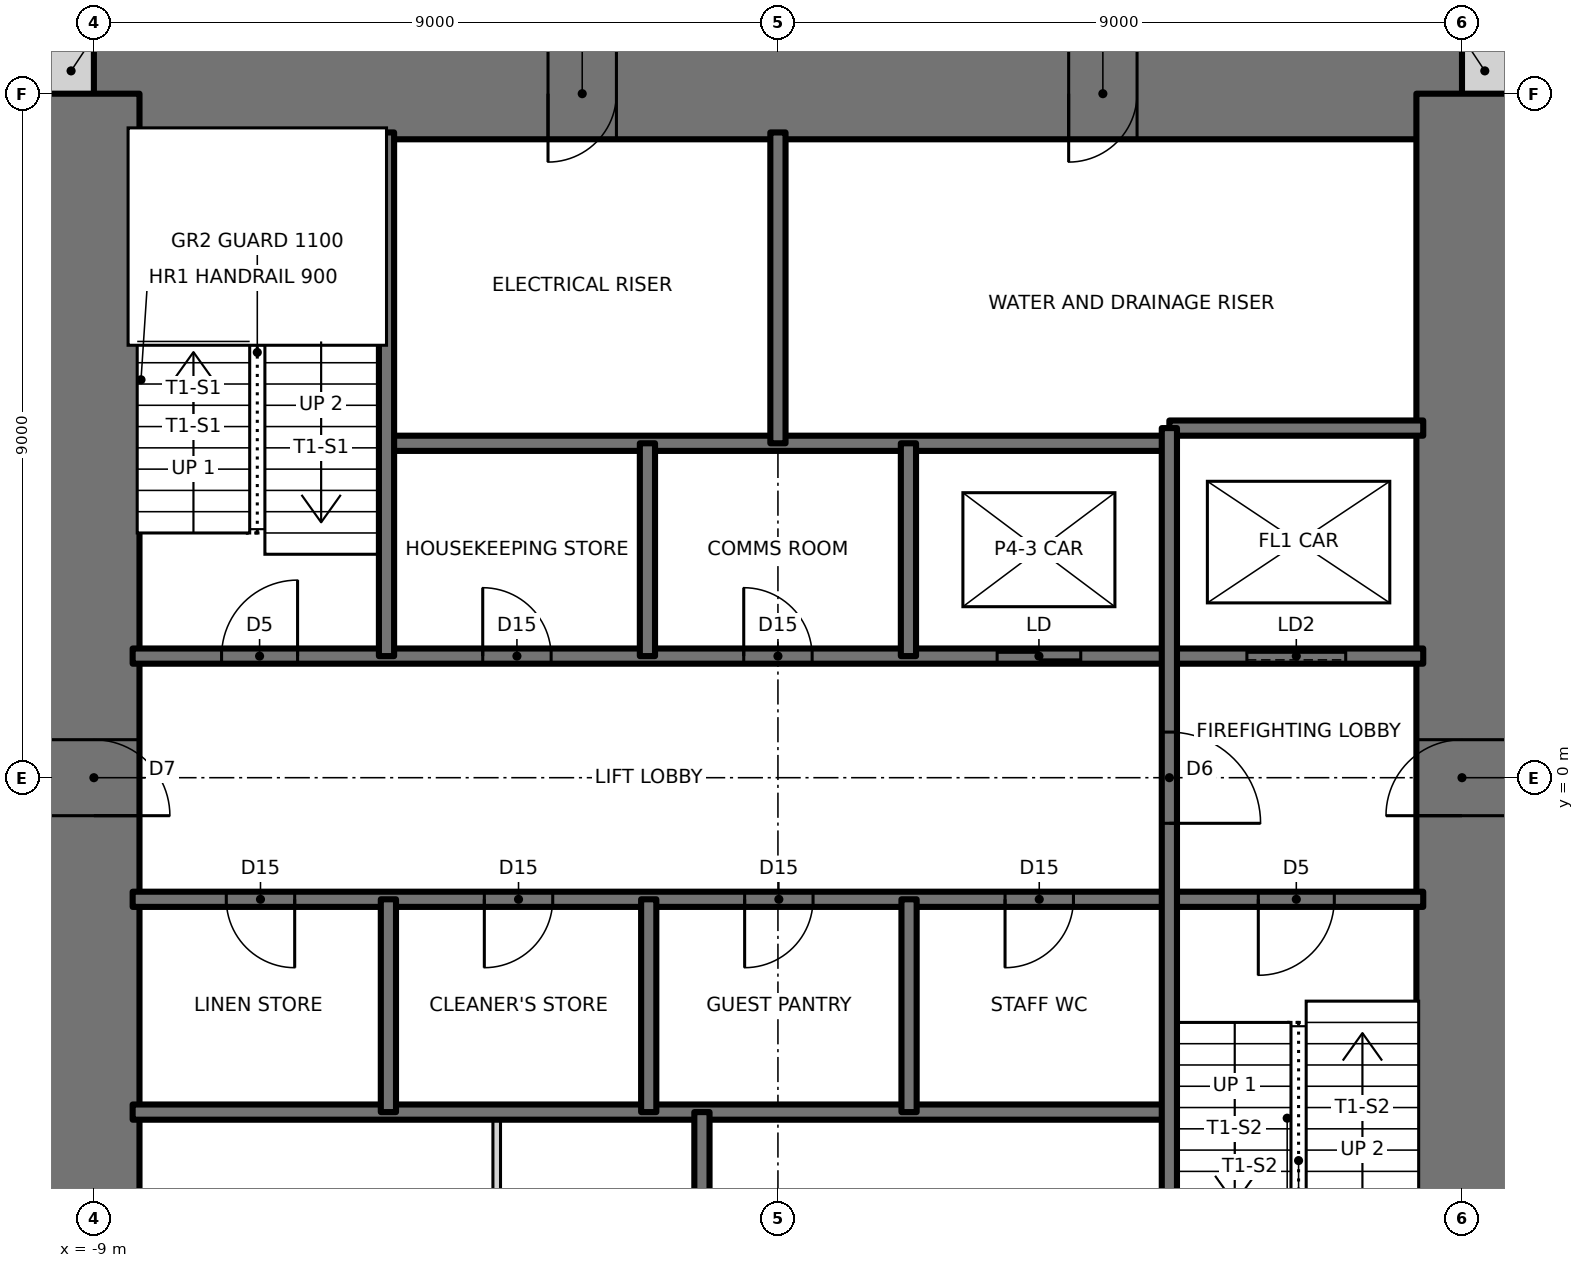
"""IFC4 building model, lengths in metres.
Left out: names, types, materials, properties, quantities, classifications, styles, units other than length and angle.
Written with IfcOpenShell. Run it as: python <this file> out.ifc"""

import sys

from ifc_helpers import new_model, si_unit, direction, frame, frame_2d, origin, place, context, subcontext, project, spatial, rectangle, extrude, element, fill, save


model = new_model("IFC4")
c1 = context("Model", 3, precision=1e-05, world=origin(), true_north=direction((0.0, 1.0)))
c2 = subcontext(c1, "Body", "Model", "MODEL_VIEW")
j1 = project(units=[si_unit("LENGTHUNIT", "METRE"), si_unit("PLANEANGLEUNIT", "RADIAN")], contexts=[c1])
p1 = place(None, origin())
s1 = spatial("IfcSite", under=j1, at=p1, CompositionType="ELEMENT")
p2 = place(p1, origin())
s2 = spatial("IfcBuilding", under=s1, at=p2, CompositionType="ELEMENT")
p3 = place(p2, frame((0.0, 0.0, 257.0)))
s3 = spatial("IfcBuildingStorey", under=s2, at=p3, CompositionType="ELEMENT", Elevation=257.0)
for number, where, z_axis, x_axis in (
    (1, (9.0, 9.3, 0.0), (0.0, 0.0, 1.0), (1.0, 0.0, 0.0)),
    (2, (-9.6, 9.3, 0.0), (0.0, 0.0, 1.0), (1.0, 0.0, 0.0)),
):
    element("IfcWall", number, at=place(p3, frame(where, z_axis=z_axis, x_axis=x_axis)), inside=s3, PredefinedType="SOLIDWALL", context=c2, shape_type="SweptSolid", body=[
        extrude(rectangle(XDim=0.6, YDim=0.6, at=frame_2d((0.3, 0.0))), origin(), (0.0, 0.0, 1.0), 3.5),
    ])
p4 = place(p3, frame((9.0, 9.0, 0.0), z_axis=(0.0, 0.0, 1.0), x_axis=(-1.0, 0.0, 0.0)))
e3 = element("IfcWall", 3, at=p4, inside=s3, PredefinedType="SHEAR", context=c2, shape_type="SweptSolid", body=[
    extrude(rectangle(XDim=18.0, YDim=1.2, at=frame_2d((9.0, 0.0))), origin(), (0.0, 0.0, 1.0), 3.5),
])
p5 = place(p4, frame((11.125, 0.0, 0.0)))
e4 = element("IfcOpeningElement", 4, at=p5, cuts=e3, PredefinedType="OPENING", context=c2, shape_type="SweptSolid", body=[
    extrude(rectangle(XDim=0.9, YDim=2.1, at=frame_2d((0.45, 1.05))), frame((0.0, 0.61, 0.0), z_axis=(0.0, -1.0, 0.0), x_axis=(1.0, 0.0, 0.0)), (0.0, 0.0, 1.0), 1.22),
])
p6 = place(p4, frame((4.275, 0.0, 0.0)))
e5 = element("IfcOpeningElement", 5, at=p6, cuts=e3, PredefinedType="OPENING", context=c2, shape_type="SweptSolid", body=[
    extrude(rectangle(XDim=0.9, YDim=2.1, at=frame_2d((0.45, 1.05))), frame((0.0, 0.61, 0.0), z_axis=(0.0, -1.0, 0.0), x_axis=(1.0, 0.0, 0.0)), (0.0, 0.0, 1.0), 1.22),
])
p7 = place(p3, frame((9.0, -9.0, 0.0), z_axis=(0.0, 0.0, 1.0), x_axis=(0.0, 1.0, 0.0)))
e6 = element("IfcWall", 6, at=p7, inside=s3, PredefinedType="SHEAR", context=c2, shape_type="SweptSolid", body=[
    extrude(rectangle(XDim=18.0, YDim=1.2, at=frame_2d((9.0, 0.0))), origin(), (0.0, 0.0, 1.0), 3.5),
])
p8 = place(p7, frame((8.5, 0.0, 0.0)))
e7 = element("IfcOpeningElement", 7, at=p8, cuts=e6, PredefinedType="OPENING", context=c2, shape_type="SweptSolid", body=[
    extrude(rectangle(XDim=1.0, YDim=2.1, at=frame_2d((0.5, 1.05))), frame((0.0, 0.61, 0.0), z_axis=(0.0, -1.0, 0.0), x_axis=(1.0, 0.0, 0.0)), (0.0, 0.0, 1.0), 1.22),
])
p9 = place(p3, frame((-9.0, 9.0, 0.0), z_axis=(0.0, 0.0, 1.0), x_axis=(0.0, -1.0, 0.0)))
e8 = element("IfcWall", 8, at=p9, inside=s3, PredefinedType="SHEAR", context=c2, shape_type="SweptSolid", body=[
    extrude(rectangle(XDim=18.0, YDim=1.2, at=frame_2d((9.0, 0.0))), origin(), (0.0, 0.0, 1.0), 3.5),
])
p10 = place(p9, frame((8.5, 0.0, 0.0)))
e9 = element("IfcOpeningElement", 9, at=p10, cuts=e8, PredefinedType="OPENING", context=c2, shape_type="SweptSolid", body=[
    extrude(rectangle(XDim=1.0, YDim=2.1, at=frame_2d((0.5, 1.05))), frame((0.0, 0.61, 0.0), z_axis=(0.0, -1.0, 0.0), x_axis=(1.0, 0.0, 0.0)), (0.0, 0.0, 1.0), 1.22),
])
p11 = place(p3, frame((-8.49, -4.4, 0.0), z_axis=(0.0, 0.0, 1.0), x_axis=(1.0, 0.0, 0.0)))
e10 = element("IfcWall", 10, at=p11, inside=s3, PredefinedType="SOLIDWALL", context=c2, shape_type="SweptSolid", body=[
    extrude(rectangle(XDim=13.64, YDim=0.2, at=frame_2d((6.82, 0.0))), origin(), (0.0, 0.0, 1.0), 3.5),
])
p12 = place(p3, frame((-8.49, -1.6, 0.0), z_axis=(0.0, 0.0, 1.0), x_axis=(1.0, 0.0, 0.0)))
e11 = element("IfcWall", 11, at=p12, inside=s3, PredefinedType="SOLIDWALL", context=c2, shape_type="SweptSolid", body=[
    extrude(rectangle(XDim=16.98, YDim=0.2, at=frame_2d((8.49, 0.0))), origin(), (0.0, 0.0, 1.0), 3.5),
])
p13 = place(p12, frame((14.81, 0.0, 0.0)))
e12 = element("IfcOpeningElement", 12, at=p13, cuts=e11, PredefinedType="OPENING", context=c2, shape_type="SweptSolid", body=[
    extrude(rectangle(XDim=1.0, YDim=2.1, at=frame_2d((0.5, 1.05))), frame((0.0, 0.11, 0.0), z_axis=(0.0, -1.0, 0.0), x_axis=(1.0, 0.0, 0.0)), (0.0, 0.0, 1.0), 0.22),
])
p14 = place(p12, frame((1.232, 0.0, 0.0)))
e13 = element("IfcOpeningElement", 13, at=p14, cuts=e11, PredefinedType="OPENING", context=c2, shape_type="SweptSolid", body=[
    extrude(rectangle(XDim=0.9, YDim=2.1, at=frame_2d((0.45, 1.05))), frame((0.0, 0.11, 0.0), z_axis=(0.0, -1.0, 0.0), x_axis=(1.0, 0.0, 0.0)), (0.0, 0.0, 1.0), 0.22),
])
p15 = place(p12, frame((4.627, 0.0, 0.0)))
e14 = element("IfcOpeningElement", 14, at=p15, cuts=e11, PredefinedType="OPENING", context=c2, shape_type="SweptSolid", body=[
    extrude(rectangle(XDim=0.9, YDim=2.1, at=frame_2d((0.45, 1.05))), frame((0.0, 0.11, 0.0), z_axis=(0.0, -1.0, 0.0), x_axis=(1.0, 0.0, 0.0)), (0.0, 0.0, 1.0), 0.22),
])
p16 = place(p12, frame((8.052, 0.0, 0.0)))
e15 = element("IfcOpeningElement", 15, at=p16, cuts=e11, PredefinedType="OPENING", context=c2, shape_type="SweptSolid", body=[
    extrude(rectangle(XDim=0.9, YDim=2.1, at=frame_2d((0.45, 1.05))), frame((0.0, 0.11, 0.0), z_axis=(0.0, -1.0, 0.0), x_axis=(1.0, 0.0, 0.0)), (0.0, 0.0, 1.0), 0.22),
])
p17 = place(p12, frame((11.478, 0.0, 0.0)))
e16 = element("IfcOpeningElement", 16, at=p17, cuts=e11, PredefinedType="OPENING", context=c2, shape_type="SweptSolid", body=[
    extrude(rectangle(XDim=0.9, YDim=2.1, at=frame_2d((0.45, 1.05))), frame((0.0, 0.11, 0.0), z_axis=(0.0, -1.0, 0.0), x_axis=(1.0, 0.0, 0.0)), (0.0, 0.0, 1.0), 0.22),
])
p18 = place(p3, frame((-8.49, 1.6, 0.0), z_axis=(0.0, 0.0, 1.0), x_axis=(1.0, 0.0, 0.0)))
e17 = element("IfcWall", 17, at=p18, inside=s3, PredefinedType="SOLIDWALL", context=c2, shape_type="SweptSolid", body=[
    extrude(rectangle(XDim=16.98, YDim=0.2, at=frame_2d((8.49, 0.0))), origin(), (0.0, 0.0, 1.0), 3.5),
])
p19 = place(p18, frame((1.17, 0.0, 0.0)))
e18 = element("IfcOpeningElement", 18, at=p19, cuts=e17, PredefinedType="OPENING", context=c2, shape_type="SweptSolid", body=[
    extrude(rectangle(XDim=1.0, YDim=2.1, at=frame_2d((0.5, 1.05))), frame((0.0, 0.11, 0.0), z_axis=(0.0, -1.0, 0.0), x_axis=(1.0, 0.0, 0.0)), (0.0, 0.0, 1.0), 0.22),
])
p20 = place(p18, frame((4.606, 0.0, 0.0)))
e19 = element("IfcOpeningElement", 19, at=p20, cuts=e17, PredefinedType="OPENING", context=c2, shape_type="SweptSolid", body=[
    extrude(rectangle(XDim=0.9, YDim=2.1, at=frame_2d((0.45, 1.05))), frame((0.0, 0.11, 0.0), z_axis=(0.0, -1.0, 0.0), x_axis=(1.0, 0.0, 0.0)), (0.0, 0.0, 1.0), 0.22),
])
p21 = place(p18, frame((8.04, 0.0, 0.0)))
e20 = element("IfcOpeningElement", 20, at=p21, cuts=e17, PredefinedType="OPENING", context=c2, shape_type="SweptSolid", body=[
    extrude(rectangle(XDim=0.9, YDim=2.1, at=frame_2d((0.45, 1.05))), frame((0.0, 0.11, 0.0), z_axis=(0.0, -1.0, 0.0), x_axis=(1.0, 0.0, 0.0)), (0.0, 0.0, 1.0), 0.22),
])
p22 = place(p18, frame((11.374, 0.0, 0.0)))
e21 = element("IfcOpeningElement", 21, at=p22, cuts=e17, PredefinedType="OPENING", context=c2, shape_type="SweptSolid", body=[
    extrude(rectangle(XDim=1.1, YDim=2.1, at=frame_2d((0.55, 1.05))), frame((0.0, 0.11, 0.0), z_axis=(0.0, -1.0, 0.0), x_axis=(1.0, 0.0, 0.0)), (0.0, 0.0, 1.0), 0.22),
])
p23 = place(p18, frame((14.66, 0.0, 0.0)))
e22 = element("IfcOpeningElement", 22, at=p23, cuts=e17, PredefinedType="OPENING", context=c2, shape_type="SweptSolid", body=[
    extrude(rectangle(XDim=1.3, YDim=2.1, at=frame_2d((0.65, 1.05))), frame((0.0, 0.11, 0.0), z_axis=(0.0, -1.0, 0.0), x_axis=(1.0, 0.0, 0.0)), (0.0, 0.0, 1.0), 0.22),
])
p24 = place(p3, frame((-5.15, 4.4, 0.0), z_axis=(0.0, 0.0, 1.0), x_axis=(1.0, 0.0, 0.0)))
e23 = element("IfcWall", 23, at=p24, inside=s3, PredefinedType="SOLIDWALL", context=c2, shape_type="SweptSolid", body=[
    extrude(rectangle(XDim=10.3, YDim=0.2, at=frame_2d((5.15, 0.0))), origin(), (0.0, 0.0, 1.0), 3.5),
])
p25 = place(p3, frame((5.15, 4.6, 0.0), z_axis=(0.0, 0.0, 1.0), x_axis=(1.0, 0.0, 0.0)))
e24 = element("IfcWall", 24, at=p25, inside=s3, PredefinedType="SOLIDWALL", context=c2, shape_type="SweptSolid", body=[
    extrude(rectangle(XDim=3.34, YDim=0.2, at=frame_2d((1.67, 0.0))), origin(), (0.0, 0.0, 1.0), 3.5),
])
p26 = place(p3, frame((5.15, -8.49, 0.0), z_axis=(0.0, 0.0, 1.0), x_axis=(0.0, 1.0, 0.0)))
e25 = element("IfcWall", 25, at=p26, inside=s3, PredefinedType="SOLIDWALL", context=c2, shape_type="SweptSolid", body=[
    extrude(rectangle(XDim=13.09, YDim=0.2, at=frame_2d((6.545, 0.0))), origin(), (0.0, 0.0, 1.0), 3.5),
])
p27 = place(p26, frame((7.89, 0.0, 0.0)))
e26 = element("IfcOpeningElement", 26, at=p27, cuts=e25, PredefinedType="OPENING", context=c2, shape_type="SweptSolid", body=[
    extrude(rectangle(XDim=1.2, YDim=2.1, at=frame_2d((0.6, 1.05))), frame((0.0, 0.11, 0.0), z_axis=(0.0, -1.0, 0.0), x_axis=(1.0, 0.0, 0.0)), (0.0, 0.0, 1.0), 0.22),
])
for number, where, z_axis, x_axis in (
    (27, (1.725, -4.4, 0.0), (0.0, 0.0, 1.0), (0.0, 1.0, 0.0)),
    (28, (1.717, 1.6, 0.0), (0.0, 0.0, 1.0), (0.0, 1.0, 0.0)),
):
    element("IfcWall", number, at=place(p3, frame(where, z_axis=z_axis, x_axis=x_axis)), inside=s3, PredefinedType="SOLIDWALL", context=c2, shape_type="SweptSolid", body=[
        extrude(rectangle(XDim=2.8, YDim=0.2, at=frame_2d((1.4, 0.0))), origin(), (0.0, 0.0, 1.0), 3.5),
    ])
for number, where, z_axis, x_axis in (
    (29, (0.0, 4.4, 0.0), (0.0, 0.0, 1.0), (0.0, 1.0, 0.0)),
    (30, (-1.0, -8.49, 0.0), (0.0, 0.0, 1.0), (0.0, 1.0, 0.0)),
):
    element("IfcWall", number, at=place(p3, frame(where, z_axis=z_axis, x_axis=x_axis)), inside=s3, PredefinedType="SOLIDWALL", context=c2, shape_type="SweptSolid", body=[
        extrude(rectangle(XDim=4.09, YDim=0.2, at=frame_2d((2.045, 0.0))), origin(), (0.0, 0.0, 1.0), 3.5),
    ])
for number, where, z_axis, x_axis in (
    (31, (-1.7, -4.4, 0.0), (0.0, 0.0, 1.0), (0.0, 1.0, 0.0)),
    (32, (-1.717, 1.6, 0.0), (0.0, 0.0, 1.0), (0.0, 1.0, 0.0)),
):
    element("IfcWall", number, at=place(p3, frame(where, z_axis=z_axis, x_axis=x_axis)), inside=s3, PredefinedType="SOLIDWALL", context=c2, shape_type="SweptSolid", body=[
        extrude(rectangle(XDim=2.8, YDim=0.2, at=frame_2d((1.4, 0.0))), origin(), (0.0, 0.0, 1.0), 3.5),
    ])
p28 = place(p3, frame((-3.7, -8.49, 0.0), z_axis=(0.0, 0.0, 1.0), x_axis=(0.0, 1.0, 0.0)))
e33 = element("IfcWall", 33, at=p28, inside=s3, PredefinedType="PARTITIONING", context=c2, shape_type="SweptSolid", body=[
    extrude(rectangle(XDim=4.09, YDim=0.1, at=frame_2d((2.045, 0.0))), origin(), (0.0, 0.0, 1.0), 3.3),
])
p29 = place(p28, frame((1.595, 0.0, 0.0)))
e34 = element("IfcOpeningElement", 34, at=p29, cuts=e33, PredefinedType="OPENING", context=c2, shape_type="SweptSolid", body=[
    extrude(rectangle(XDim=0.9, YDim=2.1, at=frame_2d((0.45, 1.05))), frame((0.0, 0.06, 0.0), z_axis=(0.0, -1.0, 0.0), x_axis=(1.0, 0.0, 0.0)), (0.0, 0.0, 1.0), 0.12),
])
p30 = place(p3, frame((-5.125, -4.4, 0.0), z_axis=(0.0, 0.0, 1.0), x_axis=(0.0, 1.0, 0.0)))
e35 = element("IfcWall", 35, at=p30, inside=s3, PredefinedType="SOLIDWALL", context=c2, shape_type="SweptSolid", body=[
    extrude(rectangle(XDim=2.8, YDim=0.2, at=frame_2d((1.4, 0.0))), origin(), (0.0, 0.0, 1.0), 3.5),
])
p31 = place(p3, frame((-5.15, 1.6, 0.0), z_axis=(0.0, 0.0, 1.0), x_axis=(0.0, 1.0, 0.0)))
e36 = element("IfcWall", 36, at=p31, inside=s3, PredefinedType="SOLIDWALL", context=c2, shape_type="SweptSolid", body=[
    extrude(rectangle(XDim=6.89, YDim=0.2, at=frame_2d((3.445, 0.0))), origin(), (0.0, 0.0, 1.0), 3.5),
])
p32 = place(p19, origin())
e37 = element("IfcDoor", 37, at=p32, inside=s3, OperationType="SINGLE_SWING_RIGHT", PredefinedType="DOOR", context=c2, shape_type="SweptSolid", body=[
    extrude(rectangle(XDim=1.0, YDim=2.1, at=frame_2d((0.5, 1.05))), frame((0.0, 0.025, 0.0), z_axis=(0.0, -1.0, 0.0), x_axis=(1.0, 0.0, 0.0)), (0.0, 0.0, 1.0), 0.05),
])
fill(e18, e37)
p33 = place(p13, frame((1.0, 0.0, 0.0), z_axis=(0.0, 0.0, 1.0), x_axis=(-1.0, 0.0, 0.0)))
e38 = element("IfcDoor", 38, at=p33, inside=s3, OperationType="SINGLE_SWING_RIGHT", PredefinedType="DOOR", context=c2, shape_type="SweptSolid", body=[
    extrude(rectangle(XDim=1.0, YDim=2.1, at=frame_2d((0.5, 1.05))), frame((0.0, 0.025, 0.0), z_axis=(0.0, -1.0, 0.0), x_axis=(1.0, 0.0, 0.0)), (0.0, 0.0, 1.0), 0.05),
])
fill(e12, e38)
p34 = place(p27, frame((1.2, 0.0, 0.0), z_axis=(0.0, 0.0, 1.0), x_axis=(-1.0, 0.0, 0.0)))
e39 = element("IfcDoor", 39, at=p34, inside=s3, OperationType="SINGLE_SWING_RIGHT", PredefinedType="DOOR", context=c2, shape_type="SweptSolid", body=[
    extrude(rectangle(XDim=1.2, YDim=2.1, at=frame_2d((0.6, 1.05))), frame((0.0, 0.025, 0.0), z_axis=(0.0, -1.0, 0.0), x_axis=(1.0, 0.0, 0.0)), (0.0, 0.0, 1.0), 0.05),
])
fill(e26, e39)
p35 = place(p20, origin())
e40 = element("IfcDoor", 40, at=p35, inside=s3, OperationType="SINGLE_SWING_LEFT", PredefinedType="DOOR", context=c2, shape_type="SweptSolid", body=[
    extrude(rectangle(XDim=0.9, YDim=2.1, at=frame_2d((0.45, 1.05))), frame((0.0, 0.025, 0.0), z_axis=(0.0, -1.0, 0.0), x_axis=(1.0, 0.0, 0.0)), (0.0, 0.0, 1.0), 0.05),
])
fill(e19, e40)
p36 = place(p21, origin())
e41 = element("IfcDoor", 41, at=p36, inside=s3, OperationType="SINGLE_SWING_LEFT", PredefinedType="DOOR", context=c2, shape_type="SweptSolid", body=[
    extrude(rectangle(XDim=0.9, YDim=2.1, at=frame_2d((0.45, 1.05))), frame((0.0, 0.025, 0.0), z_axis=(0.0, -1.0, 0.0), x_axis=(1.0, 0.0, 0.0)), (0.0, 0.0, 1.0), 0.05),
])
fill(e20, e41)
p37 = place(p14, frame((0.9, 0.0, 0.0), z_axis=(0.0, 0.0, 1.0), x_axis=(-1.0, 0.0, 0.0)))
e42 = element("IfcDoor", 42, at=p37, inside=s3, OperationType="SINGLE_SWING_LEFT", PredefinedType="DOOR", context=c2, shape_type="SweptSolid", body=[
    extrude(rectangle(XDim=0.9, YDim=2.1, at=frame_2d((0.45, 1.05))), frame((0.0, 0.025, 0.0), z_axis=(0.0, -1.0, 0.0), x_axis=(1.0, 0.0, 0.0)), (0.0, 0.0, 1.0), 0.05),
])
fill(e13, e42)
p38 = place(p15, frame((0.9, 0.0, 0.0), z_axis=(0.0, 0.0, 1.0), x_axis=(-1.0, 0.0, 0.0)))
e43 = element("IfcDoor", 43, at=p38, inside=s3, OperationType="SINGLE_SWING_RIGHT", PredefinedType="DOOR", context=c2, shape_type="SweptSolid", body=[
    extrude(rectangle(XDim=0.9, YDim=2.1, at=frame_2d((0.45, 1.05))), frame((0.0, 0.025, 0.0), z_axis=(0.0, -1.0, 0.0), x_axis=(1.0, 0.0, 0.0)), (0.0, 0.0, 1.0), 0.05),
])
fill(e14, e43)
p39 = place(p16, frame((0.9, 0.0, 0.0), z_axis=(0.0, 0.0, 1.0), x_axis=(-1.0, 0.0, 0.0)))
e44 = element("IfcDoor", 44, at=p39, inside=s3, OperationType="SINGLE_SWING_RIGHT", PredefinedType="DOOR", context=c2, shape_type="SweptSolid", body=[
    extrude(rectangle(XDim=0.9, YDim=2.1, at=frame_2d((0.45, 1.05))), frame((0.0, 0.025, 0.0), z_axis=(0.0, -1.0, 0.0), x_axis=(1.0, 0.0, 0.0)), (0.0, 0.0, 1.0), 0.05),
])
fill(e15, e44)
p40 = place(p17, frame((0.9, 0.0, 0.0), z_axis=(0.0, 0.0, 1.0), x_axis=(-1.0, 0.0, 0.0)))
e45 = element("IfcDoor", 45, at=p40, inside=s3, OperationType="SINGLE_SWING_RIGHT", PredefinedType="DOOR", context=c2, shape_type="SweptSolid", body=[
    extrude(rectangle(XDim=0.9, YDim=2.1, at=frame_2d((0.45, 1.05))), frame((0.0, 0.025, 0.0), z_axis=(0.0, -1.0, 0.0), x_axis=(1.0, 0.0, 0.0)), (0.0, 0.0, 1.0), 0.05),
])
fill(e16, e45)
p41 = place(p10, origin())
e46 = element("IfcDoor", 46, at=p41, inside=s3, OperationType="SINGLE_SWING_RIGHT", PredefinedType="DOOR", context=c2, shape_type="SweptSolid", body=[
    extrude(rectangle(XDim=1.0, YDim=2.1, at=frame_2d((0.5, 1.05))), frame((0.0, 0.025, 0.0), z_axis=(0.0, -1.0, 0.0), x_axis=(1.0, 0.0, 0.0)), (0.0, 0.0, 1.0), 0.05),
])
fill(e9, e46)
p42 = place(p8, origin())
e47 = element("IfcDoor", 47, at=p42, inside=s3, OperationType="SINGLE_SWING_LEFT", PredefinedType="DOOR", context=c2, shape_type="SweptSolid", body=[
    extrude(rectangle(XDim=1.0, YDim=2.1, at=frame_2d((0.5, 1.05))), frame((0.0, 0.025, 0.0), z_axis=(0.0, -1.0, 0.0), x_axis=(1.0, 0.0, 0.0)), (0.0, 0.0, 1.0), 0.05),
])
fill(e7, e47)
p43 = place(p5, origin())
e48 = element("IfcDoor", 48, at=p43, inside=s3, OperationType="SINGLE_SWING_RIGHT", PredefinedType="DOOR", context=c2, shape_type="SweptSolid", body=[
    extrude(rectangle(XDim=0.9, YDim=2.1, at=frame_2d((0.45, 1.05))), frame((0.0, 0.025, 0.0), z_axis=(0.0, -1.0, 0.0), x_axis=(1.0, 0.0, 0.0)), (0.0, 0.0, 1.0), 0.05),
])
fill(e4, e48)
p44 = place(p6, origin())
e49 = element("IfcDoor", 49, at=p44, inside=s3, OperationType="SINGLE_SWING_RIGHT", PredefinedType="DOOR", context=c2, shape_type="SweptSolid", body=[
    extrude(rectangle(XDim=0.9, YDim=2.1, at=frame_2d((0.45, 1.05))), frame((0.0, 0.025, 0.0), z_axis=(0.0, -1.0, 0.0), x_axis=(1.0, 0.0, 0.0)), (0.0, 0.0, 1.0), 0.05),
])
fill(e5, e49)
p45 = place(p22, origin())
e50 = element("IfcDoor", 50, at=p45, inside=s3, OperationType="DOUBLE_DOOR_SLIDING", PredefinedType="DOOR", context=c2, shape_type="SweptSolid", body=[
    extrude(rectangle(XDim=1.1, YDim=2.1, at=frame_2d((0.55, 1.05))), frame((0.0, 0.025, 0.0), z_axis=(0.0, -1.0, 0.0), x_axis=(1.0, 0.0, 0.0)), (0.0, 0.0, 1.0), 0.05),
])
fill(e21, e50)
p46 = place(p23, origin())
e51 = element("IfcDoor", 51, at=p46, inside=s3, OperationType="SLIDING_TO_LEFT", PredefinedType="DOOR", context=c2, shape_type="SweptSolid", body=[
    extrude(rectangle(XDim=1.3, YDim=2.1, at=frame_2d((0.65, 1.05))), frame((0.0, 0.025, 0.0), z_axis=(0.0, -1.0, 0.0), x_axis=(1.0, 0.0, 0.0)), (0.0, 0.0, 1.0), 0.05),
])
fill(e22, e51)
save(model, sys.argv[1])
